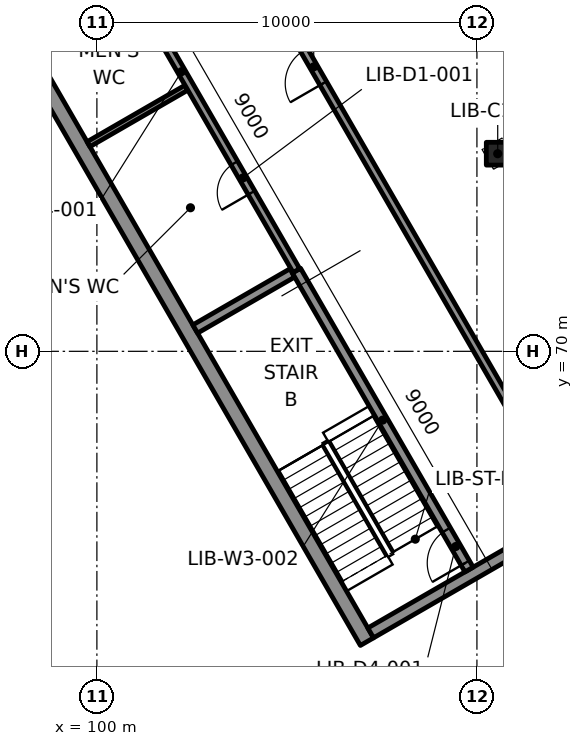
"""IFC4 building model, lengths in metres.
Left out: names, types, materials, properties, quantities, classifications, styles, units other than length and angle.
Written with IfcOpenShell. Run it as: python <this file> out.ifc"""

import sys

from ifc_helpers import new_model, si_unit, direction, frame, frame_2d, origin, origin_2d, place, context, subcontext, project, spatial, rectangle, extrude, element, fill, save


model = new_model("IFC4")
c1 = context("Model", 3, precision=1e-05, world=origin(), true_north=direction((0.0, 1.0)))
c2 = subcontext(c1, "Body", "Model", "MODEL_VIEW")
j1 = project(units=[si_unit("LENGTHUNIT", "METRE"), si_unit("PLANEANGLEUNIT", "RADIAN")], contexts=[c1])
p1 = place(None, origin())
s1 = spatial("IfcSite", under=j1, at=p1, CompositionType="ELEMENT")
p2 = place(p1, origin())
s2 = spatial("IfcBuilding", under=s1, at=p2, CompositionType="ELEMENT")
p3 = place(p2, frame((0.0, 0.0, 12.6)))
s3 = spatial("IfcBuildingStorey", under=s2, at=p3, CompositionType="ELEMENT", Elevation=12.6)
p4 = place(p3, frame((101.821, 68.315, -0.0), z_axis=(0.0, 0.0, 1.0), x_axis=(-0.5, 0.866025403784, 0.0)))
e1 = element("IfcColumn", 1, at=p4, inside=s3, PredefinedType="COLUMN", context=c2, shape_type="SweptSolid", body=[
    extrude(rectangle(XDim=1.2, YDim=1.5, at=origin_2d()), origin(), (0.0, 0.0, 1.0), 4.6),
])
p5 = place(p3, frame((103.019, 59.863, 0.0), z_axis=(0.0, 0.0, 1.0), x_axis=(-0.866027754727, 0.499995928025, 0.0)))
e2 = element("IfcWall", 2, at=p5, inside=s3, PredefinedType="PARTITIONING", context=c2, shape_type="SweptSolid", body=[
    extrude(rectangle(XDim=13.214, YDim=0.15, at=frame_2d((6.607, 0.0))), origin(), (0.0, 0.0, 1.0), 3.7),
])
p6 = place(p3, frame((110.547, 75.2, -0.36), z_axis=(0.0, 0.0, 1.0), x_axis=(1.0, 0.0, 0.0)))
e3 = element("IfcColumn", 3, at=p6, inside=s3, PredefinedType="COLUMN", context=c2, shape_type="SweptSolid", body=[
    extrude(rectangle(XDim=0.6, YDim=0.6, at=origin_2d()), origin(), (0.0, 0.0, 1.0), 4.6),
])
p7 = place(p3, frame((107.106, 62.36, 0.0), z_axis=(0.0, 0.0, 1.0), x_axis=(-0.49999992739, 0.866025445706, 0.0)))
e4 = element("IfcWall", 4, at=p7, inside=s3, PredefinedType="SOLIDWALL", context=c2, shape_type="SweptSolid", body=[
    extrude(rectangle(XDim=54.0, YDim=0.4, at=frame_2d((27.0, 0.0))), origin(), (0.0, 0.0, 1.0), 4.24),
])
p8 = place(p3, frame((132.784, 77.185, 0.0), z_axis=(0.0, 0.0, 1.0), x_axis=(-0.49999992739, 0.866025445706, 0.0)))
e5 = element("IfcWall", 5, at=p8, inside=s3, PredefinedType="SOLIDWALL", context=c2, shape_type="SweptSolid", body=[
    extrude(rectangle(XDim=54.0, YDim=0.3, at=frame_2d((27.0, 0.0))), origin(), (0.0, 0.0, 1.0), 4.24),
])
p9 = place(p8, frame((1.9, 0.0, 0.9)))
e6 = element("IfcOpeningElement", 6, at=p9, cuts=e5, PredefinedType="OPENING", context=c2, shape_type="SweptSolid", body=[
    extrude(rectangle(XDim=1.8, YDim=2.4, at=frame_2d((0.9, 1.2))), frame((0.0, 0.16, 0.0), z_axis=(0.0, -1.0, 0.0), x_axis=(1.0, 0.0, 0.0)), (0.0, 0.0, 1.0), 0.32),
])
p10 = place(p8, frame((6.3, 0.0, 0.9)))
e7 = element("IfcOpeningElement", 7, at=p10, cuts=e5, PredefinedType="OPENING", context=c2, shape_type="SweptSolid", body=[
    extrude(rectangle(XDim=1.8, YDim=2.4, at=frame_2d((0.9, 1.2))), frame((0.0, 0.16, 0.0), z_axis=(0.0, -1.0, 0.0), x_axis=(1.0, 0.0, 0.0)), (0.0, 0.0, 1.0), 0.32),
])
p11 = place(p8, frame((10.7, 0.0, 0.9)))
e8 = element("IfcOpeningElement", 8, at=p11, cuts=e5, PredefinedType="OPENING", context=c2, shape_type="SweptSolid", body=[
    extrude(rectangle(XDim=1.8, YDim=2.4, at=frame_2d((0.9, 1.2))), frame((0.0, 0.16, 0.0), z_axis=(0.0, -1.0, 0.0), x_axis=(1.0, 0.0, 0.0)), (0.0, 0.0, 1.0), 0.32),
])
p12 = place(p8, frame((15.1, 0.0, 0.9)))
e9 = element("IfcOpeningElement", 9, at=p12, cuts=e5, PredefinedType="OPENING", context=c2, shape_type="SweptSolid", body=[
    extrude(rectangle(XDim=1.8, YDim=2.4, at=frame_2d((0.9, 1.2))), frame((0.0, 0.16, 0.0), z_axis=(0.0, -1.0, 0.0), x_axis=(1.0, 0.0, 0.0)), (0.0, 0.0, 1.0), 0.32),
])
p13 = place(p8, frame((19.5, 0.0, 0.9)))
e10 = element("IfcOpeningElement", 10, at=p13, cuts=e5, PredefinedType="OPENING", context=c2, shape_type="SweptSolid", body=[
    extrude(rectangle(XDim=1.8, YDim=2.4, at=frame_2d((0.9, 1.2))), frame((0.0, 0.16, 0.0), z_axis=(0.0, -1.0, 0.0), x_axis=(1.0, 0.0, 0.0)), (0.0, 0.0, 1.0), 0.32),
])
p14 = place(p8, frame((23.9, 0.0, 0.9)))
e11 = element("IfcOpeningElement", 11, at=p14, cuts=e5, PredefinedType="OPENING", context=c2, shape_type="SweptSolid", body=[
    extrude(rectangle(XDim=1.8, YDim=2.4, at=frame_2d((0.9, 1.2))), frame((0.0, 0.16, 0.0), z_axis=(0.0, -1.0, 0.0), x_axis=(1.0, 0.0, 0.0)), (0.0, 0.0, 1.0), 0.32),
])
p15 = place(p8, frame((28.3, 0.0, 0.9)))
e12 = element("IfcOpeningElement", 12, at=p15, cuts=e5, PredefinedType="OPENING", context=c2, shape_type="SweptSolid", body=[
    extrude(rectangle(XDim=1.8, YDim=2.4, at=frame_2d((0.9, 1.2))), frame((0.0, 0.16, 0.0), z_axis=(0.0, -1.0, 0.0), x_axis=(1.0, 0.0, 0.0)), (0.0, 0.0, 1.0), 0.32),
])
p16 = place(p8, frame((32.7, 0.0, 0.9)))
e13 = element("IfcOpeningElement", 13, at=p16, cuts=e5, PredefinedType="OPENING", context=c2, shape_type="SweptSolid", body=[
    extrude(rectangle(XDim=1.8, YDim=2.4, at=frame_2d((0.9, 1.2))), frame((0.0, 0.16, 0.0), z_axis=(0.0, -1.0, 0.0), x_axis=(1.0, 0.0, 0.0)), (0.0, 0.0, 1.0), 0.32),
])
p17 = place(p8, frame((37.1, 0.0, 0.9)))
e14 = element("IfcOpeningElement", 14, at=p17, cuts=e5, PredefinedType="OPENING", context=c2, shape_type="SweptSolid", body=[
    extrude(rectangle(XDim=1.8, YDim=2.4, at=frame_2d((0.9, 1.2))), frame((0.0, 0.16, 0.0), z_axis=(0.0, -1.0, 0.0), x_axis=(1.0, 0.0, 0.0)), (0.0, 0.0, 1.0), 0.32),
])
p18 = place(p8, frame((50.3, 0.0, 0.9)))
e15 = element("IfcOpeningElement", 15, at=p18, cuts=e5, PredefinedType="OPENING", context=c2, shape_type="SweptSolid", body=[
    extrude(rectangle(XDim=1.8, YDim=2.4, at=frame_2d((0.9, 1.2))), frame((0.0, 0.16, 0.0), z_axis=(0.0, -1.0, 0.0), x_axis=(1.0, 0.0, 0.0)), (0.0, 0.0, 1.0), 0.32),
])
p19 = place(p3, frame((107.204, 62.59, 0.0), z_axis=(0.0, 0.0, 1.0), x_axis=(0.866045472092, 0.499965239061, 0.0)))
e16 = element("IfcWall", 16, at=p19, inside=s3, PredefinedType="SOLIDWALL", context=c2, shape_type="SweptSolid", body=[
    extrude(rectangle(XDim=5.6, YDim=0.3, at=frame_2d((2.8, 0.0))), origin(), (0.0, 0.0, 1.0), 4.24),
])
p20 = place(p3, frame((102.587, 70.587, 0.0), z_axis=(0.0, 0.0, 1.0), x_axis=(0.866039495442, 0.49997559174, 0.0)))
e17 = element("IfcWall", 17, at=p20, inside=s3, PredefinedType="SOLIDWALL", context=c2, shape_type="SweptSolid", body=[
    extrude(rectangle(XDim=2.95, YDim=0.25, at=frame_2d((1.475, 0.0))), origin(), (0.0, 0.0, 1.0), 4.24),
])
p21 = place(p3, frame((109.792, 64.257, 0.0), z_axis=(0.0, 0.0, 1.0), x_axis=(-0.499994616197, 0.866028512102, 0.0)))
e18 = element("IfcWall", 18, at=p21, inside=s3, PredefinedType="SOLIDWALL", context=c2, shape_type="SweptSolid", body=[
    extrude(rectangle(XDim=9.085, YDim=0.25, at=frame_2d((4.542, 0.0))), origin(), (0.0, 0.0, 1.0), 4.24),
])
p22 = place(p21, frame((0.2, 0.0, 0.0)))
e19 = element("IfcOpeningElement", 19, at=p22, cuts=e18, PredefinedType="OPENING", context=c2, shape_type="SweptSolid", body=[
    extrude(rectangle(XDim=1.0, YDim=2.1, at=frame_2d((0.5, 1.05))), frame((0.0, 0.135, 0.0), z_axis=(0.0, -1.0, 0.0), x_axis=(1.0, 0.0, 0.0)), (0.0, 0.0, 1.0), 0.27),
])
p23 = place(p3, frame((99.779, 75.45, 0.0), z_axis=(0.0, 0.0, 1.0), x_axis=(0.866017493347, 0.500013701029, 0.0)))
e20 = element("IfcWall", 20, at=p23, inside=s3, PredefinedType="PARTITIONING", context=c2, shape_type="SweptSolid", body=[
    extrude(rectangle(XDim=2.975, YDim=0.15, at=frame_2d((1.488, 0.0))), origin(), (0.0, 0.0, 1.0), 4.24),
])
p24 = place(p3, frame((105.25, 72.125, 0.0), z_axis=(0.0, 0.0, 1.0), x_axis=(-0.499996309931, 0.866027534236, 0.0)))
e21 = element("IfcWall", 21, at=p24, inside=s3, PredefinedType="PARTITIONING", context=c2, shape_type="SweptSolid", body=[
    extrude(rectangle(XDim=12.09, YDim=0.2, at=frame_2d((6.045, 0.0))), origin(), (0.0, 0.0, 1.0), 4.24),
])
p25 = place(p24, frame((2.365, 0.0, 0.0)))
e22 = element("IfcOpeningElement", 22, at=p25, cuts=e21, PredefinedType="OPENING", context=c2, shape_type="SweptSolid", body=[
    extrude(rectangle(XDim=0.9, YDim=2.1, at=frame_2d((0.45, 1.05))), frame((0.0, 0.11, 0.0), z_axis=(0.0, -1.0, 0.0), x_axis=(1.0, 0.0, 0.0)), (0.0, 0.0, 1.0), 0.22),
])
p26 = place(p24, frame((8.365, 0.0, 0.0)))
e23 = element("IfcOpeningElement", 23, at=p26, cuts=e21, PredefinedType="OPENING", context=c2, shape_type="SweptSolid", body=[
    extrude(rectangle(XDim=0.9, YDim=2.1, at=frame_2d((0.45, 1.05))), frame((0.0, 0.11, 0.0), z_axis=(0.0, -1.0, 0.0), x_axis=(1.0, 0.0, 0.0)), (0.0, 0.0, 1.0), 0.22),
])
p27 = place(p3, frame((112.496, 65.725, 0.0), z_axis=(0.0, 0.0, 1.0), x_axis=(-0.499998673217, 0.866026169802, 0.0)))
e24 = element("IfcWall", 24, at=p27, inside=s3, PredefinedType="PARTITIONING", context=c2, shape_type="SweptSolid", body=[
    extrude(rectangle(XDim=53.48, YDim=0.2, at=frame_2d((26.74, 0.0))), origin(), (0.0, 0.0, 1.0), 4.24),
])
p28 = place(p27, frame((13.08, 0.0, 0.0)))
e25 = element("IfcOpeningElement", 25, at=p28, cuts=e24, PredefinedType="OPENING", context=c2, shape_type="SweptSolid", body=[
    extrude(rectangle(XDim=1.0, YDim=2.1, at=frame_2d((0.5, 1.05))), frame((0.0, 0.11, 0.0), z_axis=(0.0, -1.0, 0.0), x_axis=(1.0, 0.0, 0.0)), (0.0, 0.0, 1.0), 0.22),
])
p29 = place(p27, frame((26.28, 0.0, 0.0)))
e26 = element("IfcOpeningElement", 26, at=p29, cuts=e24, PredefinedType="OPENING", context=c2, shape_type="SweptSolid", body=[
    extrude(rectangle(XDim=1.0, YDim=2.1, at=frame_2d((0.5, 1.05))), frame((0.0, 0.11, 0.0), z_axis=(0.0, -1.0, 0.0), x_axis=(1.0, 0.0, 0.0)), (0.0, 0.0, 1.0), 0.22),
])
p30 = place(p27, frame((43.88, 0.0, 0.0)))
e27 = element("IfcOpeningElement", 27, at=p30, cuts=e24, PredefinedType="OPENING", context=c2, shape_type="SweptSolid", body=[
    extrude(rectangle(XDim=1.0, YDim=2.1, at=frame_2d((0.5, 1.05))), frame((0.0, 0.11, 0.0), z_axis=(0.0, -1.0, 0.0), x_axis=(1.0, 0.0, 0.0)), (0.0, 0.0, 1.0), 0.22),
])
p31 = place(p27, frame((50.58, 0.0, 0.0)))
e28 = element("IfcOpeningElement", 28, at=p31, cuts=e24, PredefinedType="OPENING", context=c2, shape_type="SweptSolid", body=[
    extrude(rectangle(XDim=1.0, YDim=2.1, at=frame_2d((0.5, 1.05))), frame((0.0, 0.11, 0.0), z_axis=(0.0, -1.0, 0.0), x_axis=(1.0, 0.0, 0.0)), (0.0, 0.0, 1.0), 0.22),
])
p32 = place(p22, origin())
e29 = element("IfcDoor", 29, at=p32, inside=s3, OperationType="SINGLE_SWING_LEFT", PredefinedType="DOOR", context=c2, shape_type="SweptSolid", body=[
    extrude(rectangle(XDim=1.0, YDim=2.1, at=frame_2d((0.5, 1.05))), frame((0.0, 0.025, 0.0), z_axis=(0.0, -1.0, 0.0), x_axis=(1.0, 0.0, 0.0)), (0.0, 0.0, 1.0), 0.05),
])
fill(e19, e29)
p33 = place(p25, origin())
e30 = element("IfcDoor", 30, at=p33, inside=s3, OperationType="SINGLE_SWING_LEFT", PredefinedType="DOOR", context=c2, shape_type="SweptSolid", body=[
    extrude(rectangle(XDim=0.9, YDim=2.1, at=frame_2d((0.45, 1.05))), frame((0.0, 0.025, 0.0), z_axis=(0.0, -1.0, 0.0), x_axis=(1.0, 0.0, 0.0)), (0.0, 0.0, 1.0), 0.05),
])
fill(e22, e30)
p34 = place(p28, origin())
e31 = element("IfcDoor", 31, at=p34, inside=s3, OperationType="SINGLE_SWING_LEFT", PredefinedType="DOOR", context=c2, shape_type="SweptSolid", body=[
    extrude(rectangle(XDim=1.0, YDim=2.1, at=frame_2d((0.5, 1.05))), frame((0.0, 0.025, 0.0), z_axis=(0.0, -1.0, 0.0), x_axis=(1.0, 0.0, 0.0)), (0.0, 0.0, 1.0), 0.05),
])
fill(e25, e31)
save(model, sys.argv[1])
